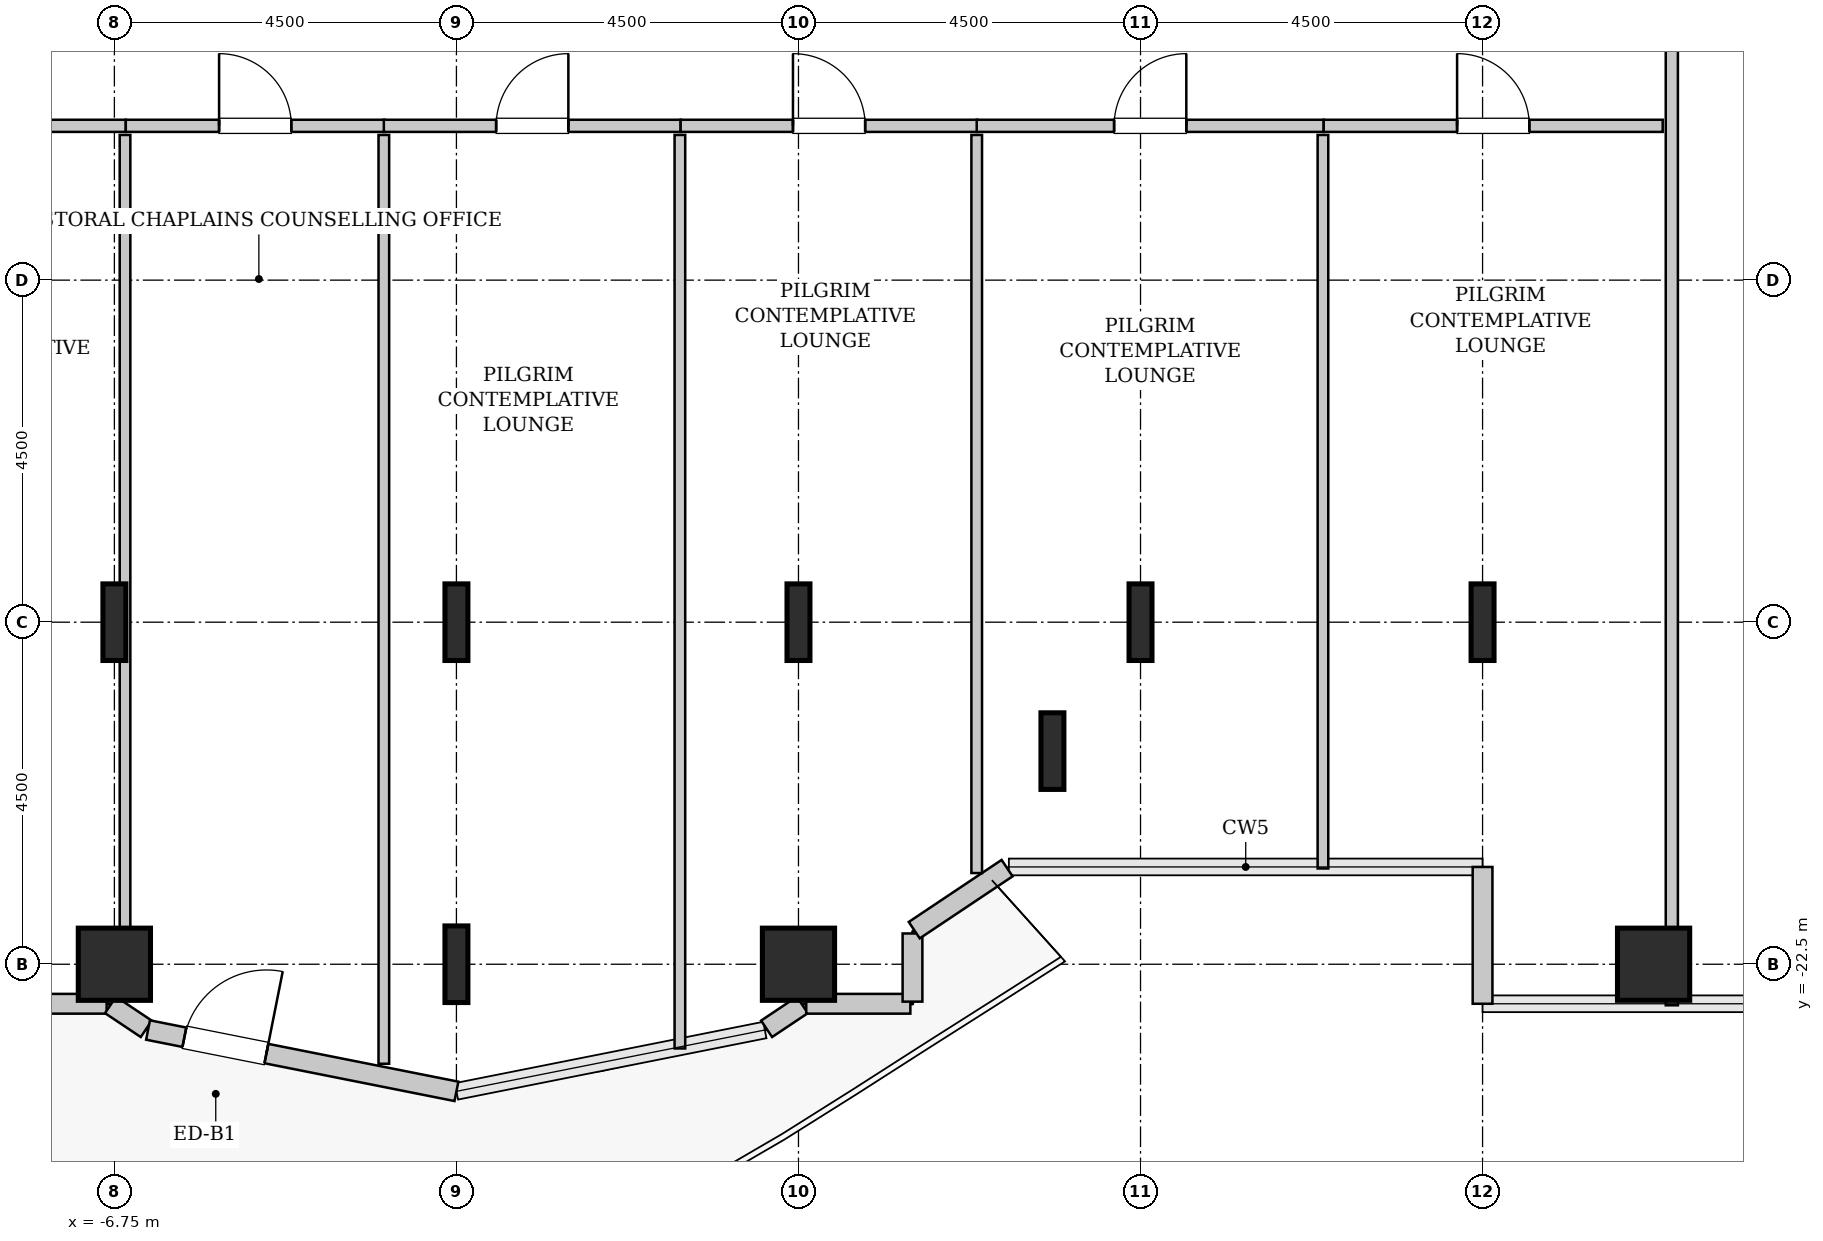
"""IFC4 building model, lengths in metres.
Left out: names, types, materials, properties, quantities, classifications, styles, units other than length and angle.
Written with IfcOpenShell. Run it as: python <this file> out.ifc"""

import sys

from ifc_helpers import new_model, si_unit, direction, frame, frame_2d, origin, origin_2d, place, context, subcontext, project, spatial, rectangle, hollow_rectangle, i_section, extrude, source, transform, mapped, element, fill, save


model = new_model("IFC4")
c1 = context("Model", 3, precision=1e-05, world=origin(), true_north=direction((0.0, 1.0)))
c2 = subcontext(c1, "Body", "Model", "MODEL_VIEW")
j1 = project(units=[si_unit("LENGTHUNIT", "METRE"), si_unit("PLANEANGLEUNIT", "RADIAN")], contexts=[c1])
p1 = place(None, origin())
s1 = spatial("IfcSite", under=j1, at=p1, CompositionType="ELEMENT")
p2 = place(p1, origin())
s2 = spatial("IfcBuilding", under=s1, at=p2, CompositionType="ELEMENT")
p3 = place(p2, frame((0.0, 0.0, 78.6)))
s3 = spatial("IfcBuildingStorey", under=s2, at=p3, CompositionType="ELEMENT", Elevation=78.6)
m1 = source(origin(), c2, "Body", "SweptSolid", [
    extrude(hollow_rectangle(XDim=0.95, YDim=0.95, WallThickness=0.045, InnerFilletRadius=0.045, OuterFilletRadius=0.09, at=origin_2d()), origin(), (0.0, 0.0, 1.0), 3.8),
])
p4 = place(p3, frame((-6.75, -22.5, 0.0), z_axis=(0.0, 0.0, 1.0), x_axis=(1.0, 0.0, 0.0)))
e1 = element("IfcColumn", 1, at=p4, inside=s3, PredefinedType="COLUMN", context=c2, shape_type="MappedRepresentation", body=[
    mapped(m1, transform((0.0, 0.0, 0.0), x_axis=(1.0, 0.0, 0.0), y_axis=(0.0, 1.0, 0.0), z_axis=(0.0, 0.0, 1.0), scale=1.0)),
])
m2 = source(origin(), c2, "Body", "SweptSolid", [
    extrude(i_section(OverallWidth=0.302, OverallDepth=1.008, WebThickness=0.021, FlangeThickness=0.04, FilletRadius=0.03, at=origin_2d()), origin(), (0.0, 0.0, 1.0), 3.8),
])
for number, where, z_axis, x_axis in (
    (2, (-6.75, -18.0, 0.0), (0.0, 0.0, 1.0), (1.0, 0.0, 0.0)),
    (3, (-2.25, -22.5, 0.0), (0.0, 0.0, 1.0), (1.0, 0.0, 0.0)),
    (4, (-2.25, -18.0, 0.0), (0.0, 0.0, 1.0), (1.0, 0.0, 0.0)),
):
    element("IfcColumn", number, at=place(p3, frame(where, z_axis=z_axis, x_axis=x_axis)), inside=s3, PredefinedType="COLUMN", context=c2, shape_type="MappedRepresentation", body=[
        mapped(m2, transform((0.0, 0.0, 0.0), x_axis=(1.0, 0.0, 0.0), y_axis=(0.0, 1.0, 0.0), z_axis=(0.0, 0.0, 1.0), scale=1.0)),
    ])
p5 = place(p3, frame((2.25, -22.5, 0.0), z_axis=(0.0, 0.0, 1.0), x_axis=(1.0, 0.0, 0.0)))
e5 = element("IfcColumn", 5, at=p5, inside=s3, PredefinedType="COLUMN", context=c2, shape_type="MappedRepresentation", body=[
    mapped(m1, transform((0.0, 0.0, 0.0), x_axis=(1.0, 0.0, 0.0), y_axis=(0.0, 1.0, 0.0), z_axis=(0.0, 0.0, 1.0), scale=1.0)),
])
for number, where, z_axis, x_axis in (
    (6, (2.25, -18.0, 0.0), (0.0, 0.0, 1.0), (1.0, 0.0, 0.0)),
    (7, (5.591, -19.696, 0.0), (0.0, 0.0, 1.0), (1.0, 0.0, 0.0)),
    (8, (6.75, -18.0, 0.0), (0.0, 0.0, 1.0), (1.0, 0.0, 0.0)),
    (9, (11.25, -18.0, 0.0), (0.0, 0.0, 1.0), (1.0, 0.0, 0.0)),
):
    element("IfcColumn", number, at=place(p3, frame(where, z_axis=z_axis, x_axis=x_axis)), inside=s3, PredefinedType="COLUMN", context=c2, shape_type="MappedRepresentation", body=[
        mapped(m2, transform((0.0, 0.0, 0.0), x_axis=(1.0, 0.0, 0.0), y_axis=(0.0, 1.0, 0.0), z_axis=(0.0, 0.0, 1.0), scale=1.0)),
    ])
p6 = place(p3, frame((13.5, -22.5, 0.0), z_axis=(0.0, 0.0, 1.0), x_axis=(1.0, 0.0, 0.0)))
e10 = element("IfcColumn", 10, at=p6, inside=s3, PredefinedType="COLUMN", context=c2, shape_type="MappedRepresentation", body=[
    mapped(m1, transform((0.0, 0.0, 0.0), x_axis=(1.0, 0.0, 0.0), y_axis=(0.0, 1.0, 0.0), z_axis=(0.0, 0.0, 1.0), scale=1.0)),
])
m3 = source(origin(), c2, "Body", "SweptSolid", [
    extrude(rectangle(XDim=1.8, YDim=0.26, at=frame_2d((0.9, 0.0))), origin(), (0.0, 0.0, 1.0), 3.55),
])
p7 = place(p3, frame((11.25, -21.22, 0.0), z_axis=(0.0, 0.0, 1.0), x_axis=(0.0, -1.0, 0.0)))
e11 = element("IfcWall", 11, at=p7, inside=s3, PredefinedType="SOLIDWALL", context=c2, shape_type="MappedRepresentation", body=[
    mapped(m3, transform((0.0, 0.0, 0.0), x_axis=(1.0, 0.0, 0.0), y_axis=(0.0, 1.0, 0.0), z_axis=(0.0, 0.0, 1.0), scale=1.0)),
])
m4 = source(origin(), c2, "Body", "SweptSolid", [
    extrude(rectangle(XDim=1.37, YDim=0.26, at=frame_2d((0.685, 0.0))), origin(), (0.0, 0.0, 1.0), 3.55),
])
p8 = place(p3, frame((-8.222, -23.02, 0.0), z_axis=(0.0, 0.0, 1.0), x_axis=(1.0, 0.0, 0.0)))
e12 = element("IfcWall", 12, at=p8, inside=s3, PredefinedType="SOLIDWALL", context=c2, shape_type="MappedRepresentation", body=[
    mapped(m4, transform((0.0, 0.0, 0.0), x_axis=(1.0, 0.0, 0.0), y_axis=(0.0, 1.0, 0.0), z_axis=(0.0, 0.0, 1.0), scale=1.0)),
])
m5 = source(origin(), c2, "Body", "SweptSolid", [
    extrude(rectangle(XDim=0.565, YDim=0.26, at=frame_2d((0.283, 0.0))), origin(), (0.0, 0.0, 1.0), 3.55),
])
p9 = place(p3, frame((-6.801, -23.036, 0.0), z_axis=(0.0, 0.0, 1.0), x_axis=(0.831651492666, -0.555297933317, 0.0)))
e13 = element("IfcWall", 13, at=p9, inside=s3, PredefinedType="SOLIDWALL", context=c2, shape_type="MappedRepresentation", body=[
    mapped(m5, transform((0.0, 0.0, 0.0), x_axis=(1.0, 0.0, 0.0), y_axis=(0.0, 1.0, 0.0), z_axis=(0.0, 0.0, 1.0), scale=1.0)),
])
m6 = source(origin(), c2, "Body", "SweptSolid", [
    extrude(rectangle(XDim=4.137, YDim=0.26, at=frame_2d((2.068, 0.0))), origin(), (0.0, 0.0, 1.0), 3.55),
])
p10 = place(p3, frame((-6.307, -23.365, 0.0), z_axis=(0.0, 0.0, 1.0), x_axis=(0.980782170794, -0.195105954428, 0.0)))
e14 = element("IfcWall", 14, at=p10, inside=s3, PredefinedType="SOLIDWALL", context=c2, shape_type="MappedRepresentation", body=[
    mapped(m6, transform((0.0, 0.0, 0.0), x_axis=(1.0, 0.0, 0.0), y_axis=(0.0, 1.0, 0.0), z_axis=(0.0, 0.0, 1.0), scale=1.0)),
])
p11 = place(p10, frame((0.488, 0.0, 0.0)))
e15 = element("IfcOpeningElement", 15, at=p11, cuts=e14, PredefinedType="OPENING", context=c2, shape_type="SweptSolid", body=[
    extrude(rectangle(XDim=1.1, YDim=2.2, at=frame_2d((0.55, 1.1))), frame((0.0, 0.14, 0.0), z_axis=(0.0, -1.0, 0.0), x_axis=(1.0, 0.0, 0.0)), (0.0, 0.0, 1.0), 0.28),
])
p12 = place(p3, frame((1.831, -23.35, 0.0), z_axis=(0.0, 0.0, 1.0), x_axis=(0.831651492666, 0.555297933317, 0.0)))
e16 = element("IfcWall", 16, at=p12, inside=s3, PredefinedType="SOLIDWALL", context=c2, shape_type="MappedRepresentation", body=[
    mapped(m5, transform((0.0, 0.0, 0.0), x_axis=(1.0, 0.0, 0.0), y_axis=(0.0, 1.0, 0.0), z_axis=(0.0, 0.0, 1.0), scale=1.0)),
])
p13 = place(p3, frame((2.352, -23.02, 0.0), z_axis=(0.0, 0.0, 1.0), x_axis=(1.0, 0.0, 0.0)))
e17 = element("IfcWall", 17, at=p13, inside=s3, PredefinedType="SOLIDWALL", context=c2, shape_type="MappedRepresentation", body=[
    mapped(m4, transform((0.0, 0.0, 0.0), x_axis=(1.0, 0.0, 0.0), y_axis=(0.0, 1.0, 0.0), z_axis=(0.0, 0.0, 1.0), scale=1.0)),
])
m7 = source(origin(), c2, "Body", "SweptSolid", [
    extrude(rectangle(XDim=0.897, YDim=0.26, at=frame_2d((0.448, 0.0))), origin(), (0.0, 0.0, 1.0), 3.55),
])
p14 = place(p3, frame((3.75, -22.992, 0.0), z_axis=(0.0, 0.0, 1.0), x_axis=(0.0, 1.0, 0.0)))
e18 = element("IfcWall", 18, at=p14, inside=s3, PredefinedType="SOLIDWALL", context=c2, shape_type="MappedRepresentation", body=[
    mapped(m7, transform((0.0, 0.0, 0.0), x_axis=(1.0, 0.0, 0.0), y_axis=(0.0, 1.0, 0.0), z_axis=(0.0, 0.0, 1.0), scale=1.0)),
])
m8 = source(origin(), c2, "Body", "SweptSolid", [
    extrude(rectangle(XDim=1.469, YDim=0.26, at=frame_2d((0.734, 0.0))), origin(), (0.0, 0.0, 1.0), 3.55),
])
p15 = place(p3, frame((3.773, -22.052, 0.0), z_axis=(0.0, 0.0, 1.0), x_axis=(0.831461760506, 0.555581983884, 0.0)))
e19 = element("IfcWall", 19, at=p15, inside=s3, PredefinedType="SOLIDWALL", context=c2, shape_type="MappedRepresentation", body=[
    mapped(m8, transform((0.0, 0.0, 0.0), x_axis=(1.0, 0.0, 0.0), y_axis=(0.0, 1.0, 0.0), z_axis=(0.0, 0.0, 1.0), scale=1.0)),
])
m9 = source(origin(), c2, "Body", "SweptSolid", [
    extrude(rectangle(XDim=14.845, YDim=0.16, at=frame_2d((7.422, 0.0))), origin(), (0.0, 0.0, 1.0), 3.535),
])
p16 = place(p3, frame((13.74, -23.04, 0.0), z_axis=(0.0, 0.0, 1.0), x_axis=(0.0, 1.0, 0.0)))
e20 = element("IfcWall", 20, at=p16, inside=s3, PredefinedType="PARTITIONING", context=c2, shape_type="MappedRepresentation", body=[
    mapped(m9, transform((0.0, 0.0, 0.0), x_axis=(1.0, 0.0, 0.0), y_axis=(0.0, 1.0, 0.0), z_axis=(0.0, 0.0, 1.0), scale=1.0)),
])
p17 = place(p16, frame((12.712, 0.0, 0.0)))
e21 = element("IfcOpeningElement", 21, at=p17, cuts=e20, PredefinedType="OPENING", context=c2, shape_type="SweptSolid", body=[
    extrude(rectangle(XDim=0.95, YDim=2.1, at=frame_2d((0.475, 1.05))), frame((0.0, 0.09, 0.0), z_axis=(0.0, -1.0, 0.0), x_axis=(1.0, 0.0, 0.0)), (0.0, 0.0, 1.0), 0.18),
])
m10 = source(origin(), c2, "Body", "SweptSolid", [
    extrude(rectangle(XDim=3.405, YDim=0.16, at=frame_2d((1.702, 0.0))), origin(), (0.0, 0.0, 1.0), 3.535),
])
p18 = place(p3, frame((-10.005, -11.47, 0.0), z_axis=(0.0, 0.0, 1.0), x_axis=(1.0, 0.0, 0.0)))
e22 = element("IfcWall", 22, at=p18, inside=s3, PredefinedType="PARTITIONING", context=c2, shape_type="MappedRepresentation", body=[
    mapped(m10, transform((0.0, 0.0, 0.0), x_axis=(1.0, 0.0, 0.0), y_axis=(0.0, 1.0, 0.0), z_axis=(0.0, 0.0, 1.0), scale=1.0)),
])
p19 = place(p18, frame((1.228, 0.0, 0.0)))
e23 = element("IfcOpeningElement", 23, at=p19, cuts=e22, PredefinedType="OPENING", context=c2, shape_type="SweptSolid", body=[
    extrude(rectangle(XDim=0.95, YDim=2.1, at=frame_2d((0.475, 1.05))), frame((0.0, 0.09, 0.0), z_axis=(0.0, -1.0, 0.0), x_axis=(1.0, 0.0, 0.0)), (0.0, 0.0, 1.0), 0.18),
])
m11 = source(origin(), c2, "Body", "SweptSolid", [
    extrude(rectangle(XDim=11.371, YDim=0.14, at=frame_2d((5.686, 0.0))), origin(), (0.0, 0.0, 1.0), 2.825),
])
p20 = place(p3, frame((-6.61, -22.961, 0.0), z_axis=(0.0, 0.0, 1.0), x_axis=(0.0, 1.0, 0.0)))
e24 = element("IfcWall", 24, at=p20, inside=s3, PredefinedType="PARTITIONING", context=c2, shape_type="MappedRepresentation", body=[
    mapped(m11, transform((0.0, 0.0, 0.0), x_axis=(1.0, 0.0, 0.0), y_axis=(0.0, 1.0, 0.0), z_axis=(0.0, 0.0, 1.0), scale=1.0)),
])
m12 = source(origin(), c2, "Body", "SweptSolid", [
    extrude(rectangle(XDim=3.405, YDim=0.16, at=frame_2d((1.703, 0.0))), origin(), (0.0, 0.0, 1.0), 3.535),
])
p21 = place(p3, frame((-6.6, -11.47, 0.0), z_axis=(0.0, 0.0, 1.0), x_axis=(1.0, 0.0, 0.0)))
e25 = element("IfcWall", 25, at=p21, inside=s3, PredefinedType="PARTITIONING", context=c2, shape_type="MappedRepresentation", body=[
    mapped(m12, transform((0.0, 0.0, 0.0), x_axis=(1.0, 0.0, 0.0), y_axis=(0.0, 1.0, 0.0), z_axis=(0.0, 0.0, 1.0), scale=1.0)),
])
p22 = place(p21, frame((1.228, 0.0, 0.0)))
e26 = element("IfcOpeningElement", 26, at=p22, cuts=e25, PredefinedType="OPENING", context=c2, shape_type="SweptSolid", body=[
    extrude(rectangle(XDim=0.95, YDim=2.1, at=frame_2d((0.475, 1.05))), frame((0.0, 0.09, 0.0), z_axis=(0.0, -1.0, 0.0), x_axis=(1.0, 0.0, 0.0)), (0.0, 0.0, 1.0), 0.18),
])
m13 = source(origin(), c2, "Body", "SweptSolid", [
    extrude(rectangle(XDim=12.219, YDim=0.14, at=frame_2d((6.11, 0.0))), origin(), (0.0, 0.0, 1.0), 3.535),
])
p23 = place(p3, frame((-3.205, -23.809, 0.0), z_axis=(0.0, 0.0, 1.0), x_axis=(0.0, 1.0, 0.0)))
e27 = element("IfcWall", 27, at=p23, inside=s3, PredefinedType="PARTITIONING", context=c2, shape_type="MappedRepresentation", body=[
    mapped(m13, transform((0.0, 0.0, 0.0), x_axis=(1.0, 0.0, 0.0), y_axis=(0.0, 1.0, 0.0), z_axis=(0.0, 0.0, 1.0), scale=1.0)),
])
m14 = source(origin(), c2, "Body", "SweptSolid", [
    extrude(rectangle(XDim=3.905, YDim=0.16, at=frame_2d((1.953, 0.0))), origin(), (0.0, 0.0, 1.0), 3.535),
])
p24 = place(p3, frame((-3.205, -11.47, 0.0), z_axis=(0.0, 0.0, 1.0), x_axis=(1.0, 0.0, 0.0)))
e28 = element("IfcWall", 28, at=p24, inside=s3, PredefinedType="PARTITIONING", context=c2, shape_type="MappedRepresentation", body=[
    mapped(m14, transform((0.0, 0.0, 0.0), x_axis=(1.0, 0.0, 0.0), y_axis=(0.0, 1.0, 0.0), z_axis=(0.0, 0.0, 1.0), scale=1.0)),
])
p25 = place(p24, frame((1.478, 0.0, 0.0)))
e29 = element("IfcOpeningElement", 29, at=p25, cuts=e28, PredefinedType="OPENING", context=c2, shape_type="SweptSolid", body=[
    extrude(rectangle(XDim=0.95, YDim=2.1, at=frame_2d((0.475, 1.05))), frame((0.0, 0.09, 0.0), z_axis=(0.0, -1.0, 0.0), x_axis=(1.0, 0.0, 0.0)), (0.0, 0.0, 1.0), 0.18),
])
m15 = source(origin(), c2, "Body", "SweptSolid", [
    extrude(rectangle(XDim=12.018, YDim=0.14, at=frame_2d((6.009, 0.0))), origin(), (0.0, 0.0, 1.0), 3.535),
])
p26 = place(p3, frame((0.69, -23.608, 0.0), z_axis=(0.0, 0.0, 1.0), x_axis=(0.0, 1.0, 0.0)))
e30 = element("IfcWall", 30, at=p26, inside=s3, PredefinedType="PARTITIONING", context=c2, shape_type="MappedRepresentation", body=[
    mapped(m15, transform((0.0, 0.0, 0.0), x_axis=(1.0, 0.0, 0.0), y_axis=(0.0, 1.0, 0.0), z_axis=(0.0, 0.0, 1.0), scale=1.0)),
])
p27 = place(p3, frame((0.7, -11.47, 0.0), z_axis=(0.0, 0.0, 1.0), x_axis=(1.0, 0.0, 0.0)))
e31 = element("IfcWall", 31, at=p27, inside=s3, PredefinedType="PARTITIONING", context=c2, shape_type="MappedRepresentation", body=[
    mapped(m14, transform((0.0, 0.0, 0.0), x_axis=(1.0, 0.0, 0.0), y_axis=(0.0, 1.0, 0.0), z_axis=(0.0, 0.0, 1.0), scale=1.0)),
])
p28 = place(p27, frame((1.478, 0.0, 0.0)))
e32 = element("IfcOpeningElement", 32, at=p28, cuts=e31, PredefinedType="OPENING", context=c2, shape_type="SweptSolid", body=[
    extrude(rectangle(XDim=0.95, YDim=2.1, at=frame_2d((0.475, 1.05))), frame((0.0, 0.09, 0.0), z_axis=(0.0, -1.0, 0.0), x_axis=(1.0, 0.0, 0.0)), (0.0, 0.0, 1.0), 0.18),
])
m16 = source(origin(), c2, "Body", "SweptSolid", [
    extrude(rectangle(XDim=9.71, YDim=0.14, at=frame_2d((4.855, 0.0))), origin(), (0.0, 0.0, 1.0), 3.535),
])
p29 = place(p3, frame((4.595, -21.301, 0.0), z_axis=(0.0, 0.0, 1.0), x_axis=(0.0, 1.0, 0.0)))
e33 = element("IfcWall", 33, at=p29, inside=s3, PredefinedType="PARTITIONING", context=c2, shape_type="MappedRepresentation", body=[
    mapped(m16, transform((0.0, 0.0, 0.0), x_axis=(1.0, 0.0, 0.0), y_axis=(0.0, 1.0, 0.0), z_axis=(0.0, 0.0, 1.0), scale=1.0)),
])
m17 = source(origin(), c2, "Body", "SweptSolid", [
    extrude(rectangle(XDim=4.565, YDim=0.16, at=frame_2d((2.282, 0.0))), origin(), (0.0, 0.0, 1.0), 3.535),
])
p30 = place(p3, frame((4.595, -11.47, 0.0), z_axis=(0.0, 0.0, 1.0), x_axis=(1.0, 0.0, 0.0)))
e34 = element("IfcWall", 34, at=p30, inside=s3, PredefinedType="PARTITIONING", context=c2, shape_type="MappedRepresentation", body=[
    mapped(m17, transform((0.0, 0.0, 0.0), x_axis=(1.0, 0.0, 0.0), y_axis=(0.0, 1.0, 0.0), z_axis=(0.0, 0.0, 1.0), scale=1.0)),
])
p31 = place(p30, frame((1.808, 0.0, 0.0)))
e35 = element("IfcOpeningElement", 35, at=p31, cuts=e34, PredefinedType="OPENING", context=c2, shape_type="SweptSolid", body=[
    extrude(rectangle(XDim=0.95, YDim=2.1, at=frame_2d((0.475, 1.05))), frame((0.0, 0.09, 0.0), z_axis=(0.0, -1.0, 0.0), x_axis=(1.0, 0.0, 0.0)), (0.0, 0.0, 1.0), 0.18),
])
m18 = source(origin(), c2, "Body", "SweptSolid", [
    extrude(rectangle(XDim=9.65, YDim=0.14, at=frame_2d((4.825, 0.0))), origin(), (0.0, 0.0, 1.0), 3.535),
])
p32 = place(p3, frame((9.15, -21.24, 0.0), z_axis=(0.0, 0.0, 1.0), x_axis=(0.0, 1.0, 0.0)))
e36 = element("IfcWall", 36, at=p32, inside=s3, PredefinedType="PARTITIONING", context=c2, shape_type="MappedRepresentation", body=[
    mapped(m18, transform((0.0, 0.0, 0.0), x_axis=(1.0, 0.0, 0.0), y_axis=(0.0, 1.0, 0.0), z_axis=(0.0, 0.0, 1.0), scale=1.0)),
])
m19 = source(origin(), c2, "Body", "SweptSolid", [
    extrude(rectangle(XDim=4.46, YDim=0.16, at=frame_2d((2.23, 0.0))), origin(), (0.0, 0.0, 1.0), 3.535),
])
p33 = place(p3, frame((9.16, -11.47, 0.0), z_axis=(0.0, 0.0, 1.0), x_axis=(1.0, 0.0, 0.0)))
e37 = element("IfcWall", 37, at=p33, inside=s3, PredefinedType="PARTITIONING", context=c2, shape_type="MappedRepresentation", body=[
    mapped(m19, transform((0.0, 0.0, 0.0), x_axis=(1.0, 0.0, 0.0), y_axis=(0.0, 1.0, 0.0), z_axis=(0.0, 0.0, 1.0), scale=1.0)),
])
p34 = place(p33, frame((1.755, 0.0, 0.0)))
e38 = element("IfcOpeningElement", 38, at=p34, cuts=e37, PredefinedType="OPENING", context=c2, shape_type="SweptSolid", body=[
    extrude(rectangle(XDim=0.95, YDim=2.1, at=frame_2d((0.475, 1.05))), frame((0.0, 0.09, 0.0), z_axis=(0.0, -1.0, 0.0), x_axis=(1.0, 0.0, 0.0)), (0.0, 0.0, 1.0), 0.18),
])
m20 = source(origin(), c2, "Body", "SweptSolid", [
    extrude(rectangle(XDim=1.1, YDim=2.2, at=frame_2d((0.55, 1.1))), frame((0.0, 0.025, 0.0), z_axis=(0.0, -1.0, 0.0), x_axis=(1.0, 0.0, 0.0)), (0.0, 0.0, 1.0), 0.05),
])
p35 = place(p11, origin())
e39 = element("IfcDoor", 39, at=p35, inside=s3, OperationType="SINGLE_SWING_RIGHT", PredefinedType="DOOR", context=c2, shape_type="MappedRepresentation", body=[
    mapped(m20, transform((0.0, 0.0, 0.0), x_axis=(1.0, 0.0, 0.0), y_axis=(0.0, 1.0, 0.0), z_axis=(0.0, 0.0, 1.0), scale=1.0)),
])
fill(e15, e39)
m21 = source(origin(), c2, "Body", "SweptSolid", [
    extrude(rectangle(XDim=0.95, YDim=2.1, at=frame_2d((0.475, 1.05))), frame((0.0, 0.025, 0.0), z_axis=(0.0, -1.0, 0.0), x_axis=(1.0, 0.0, 0.0)), (0.0, 0.0, 1.0), 0.05),
])
p36 = place(p22, origin())
e40 = element("IfcDoor", 40, at=p36, inside=s3, OperationType="SINGLE_SWING_LEFT", PredefinedType="DOOR", context=c2, shape_type="MappedRepresentation", body=[
    mapped(m21, transform((0.0, 0.0, 0.0), x_axis=(1.0, 0.0, 0.0), y_axis=(0.0, 1.0, 0.0), z_axis=(0.0, 0.0, 1.0), scale=1.0)),
])
fill(e26, e40)
p37 = place(p25, origin())
e41 = element("IfcDoor", 41, at=p37, inside=s3, OperationType="SINGLE_SWING_RIGHT", PredefinedType="DOOR", context=c2, shape_type="MappedRepresentation", body=[
    mapped(m21, transform((0.0, 0.0, 0.0), x_axis=(1.0, 0.0, 0.0), y_axis=(0.0, 1.0, 0.0), z_axis=(0.0, 0.0, 1.0), scale=1.0)),
])
fill(e29, e41)
p38 = place(p28, origin())
e42 = element("IfcDoor", 42, at=p38, inside=s3, OperationType="SINGLE_SWING_LEFT", PredefinedType="DOOR", context=c2, shape_type="MappedRepresentation", body=[
    mapped(m21, transform((0.0, 0.0, 0.0), x_axis=(1.0, 0.0, 0.0), y_axis=(0.0, 1.0, 0.0), z_axis=(0.0, 0.0, 1.0), scale=1.0)),
])
fill(e32, e42)
p39 = place(p31, origin())
e43 = element("IfcDoor", 43, at=p39, inside=s3, OperationType="SINGLE_SWING_RIGHT", PredefinedType="DOOR", context=c2, shape_type="MappedRepresentation", body=[
    mapped(m21, transform((0.0, 0.0, 0.0), x_axis=(1.0, 0.0, 0.0), y_axis=(0.0, 1.0, 0.0), z_axis=(0.0, 0.0, 1.0), scale=1.0)),
])
fill(e35, e43)
p40 = place(p34, origin())
e44 = element("IfcDoor", 44, at=p40, inside=s3, OperationType="SINGLE_SWING_LEFT", PredefinedType="DOOR", context=c2, shape_type="MappedRepresentation", body=[
    mapped(m21, transform((0.0, 0.0, 0.0), x_axis=(1.0, 0.0, 0.0), y_axis=(0.0, 1.0, 0.0), z_axis=(0.0, 0.0, 1.0), scale=1.0)),
])
fill(e38, e44)
save(model, sys.argv[1])
